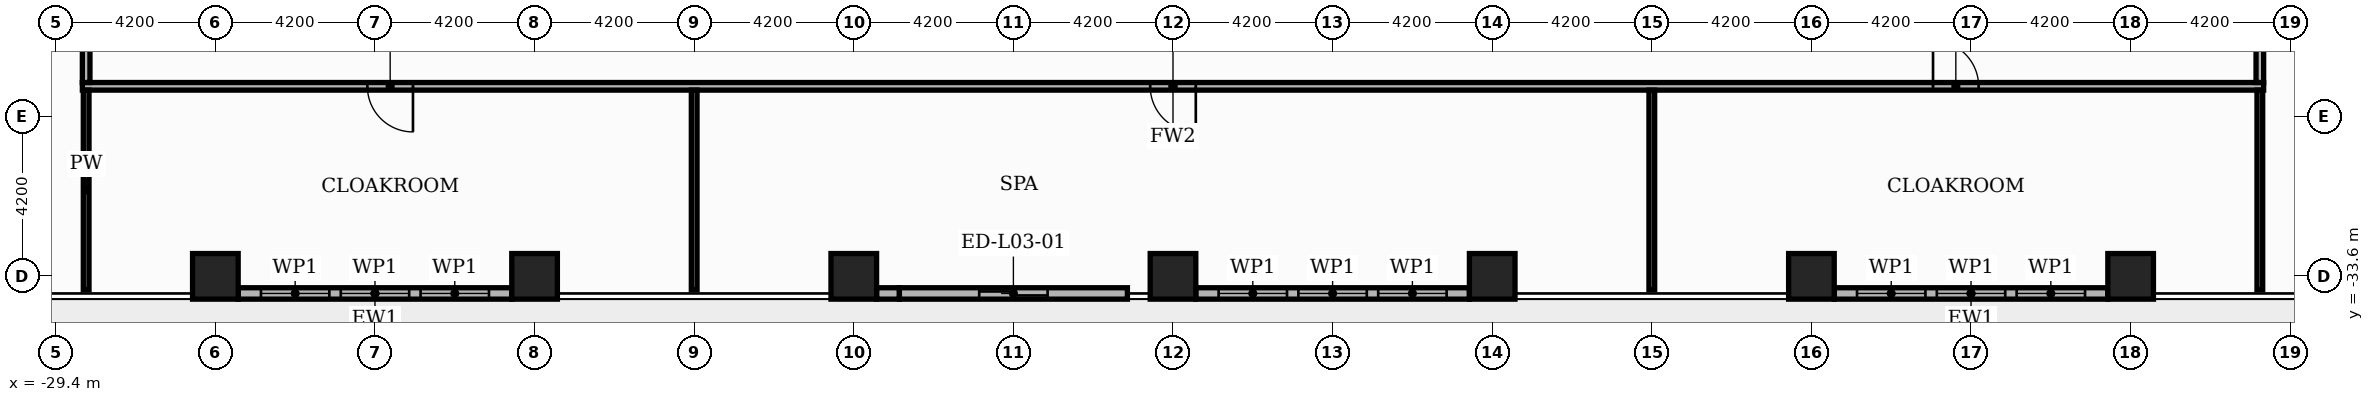
"""IFC4 building model, lengths in metres.
Left out: names, types, materials, properties, quantities, classifications, styles, units other than length and angle.
Written with IfcOpenShell. Run it as: python <this file> out.ifc"""

import sys

from ifc_helpers import new_model, si_unit, direction, frame, frame_2d, origin, origin_2d, place, context, subcontext, project, spatial, rectangle, extrude, element, fill, save


model = new_model("IFC4")
c1 = context("Model", 3, precision=1e-05, world=origin(), true_north=direction((0.0, 1.0)))
c2 = subcontext(c1, "Body", "Model", "MODEL_VIEW")
j1 = project(units=[si_unit("LENGTHUNIT", "METRE"), si_unit("PLANEANGLEUNIT", "RADIAN")], contexts=[c1])
p1 = place(None, origin())
s1 = spatial("IfcSite", under=j1, at=p1, CompositionType="ELEMENT")
p2 = place(p1, origin())
s2 = spatial("IfcBuilding", under=s1, at=p2, CompositionType="ELEMENT")
p3 = place(p2, frame((0.0, 0.0, 16.8)))
s3 = spatial("IfcBuildingStorey", under=s2, at=p3, CompositionType="ELEMENT", Elevation=16.8)
for number, where, z_axis, x_axis in (
    (1, (0.0, -33.6, 0.0), (0.0, 0.0, 1.0), (1.0, 0.0, 0.0)),
    (2, (8.4, -33.6, 0.0), (0.0, 0.0, 1.0), (1.0, 0.0, 0.0)),
    (3, (16.8, -33.6, 0.0), (0.0, 0.0, 1.0), (1.0, 0.0, 0.0)),
    (4, (25.2, -33.6, 0.0), (0.0, 0.0, 1.0), (1.0, 0.0, 0.0)),
    (5, (-8.4, -33.6, 0.0), (0.0, 0.0, 1.0), (1.0, 0.0, 0.0)),
    (6, (-16.8, -33.6, 0.0), (0.0, 0.0, 1.0), (1.0, 0.0, 0.0)),
    (7, (-25.2, -33.6, 0.0), (0.0, 0.0, 1.0), (1.0, 0.0, 0.0)),
):
    element("IfcColumn", number, at=place(p3, frame(where, z_axis=z_axis, x_axis=x_axis)), inside=s3, PredefinedType="COLUMN", context=c2, shape_type="SweptSolid", body=[
        extrude(rectangle(XDim=1.2, YDim=1.2, at=origin_2d()), origin(), (0.0, 0.0, 1.0), 5.4),
    ])
p4 = place(p3, frame((-24.6, -34.05, 0.0), z_axis=(0.0, 0.0, 1.0), x_axis=(1.0, 0.0, 0.0)))
e8 = element("IfcWall", 8, at=p4, inside=s3, PredefinedType="STANDARD", context=c2, shape_type="SweptSolid", body=[
    extrude(rectangle(XDim=7.2, YDim=0.3, at=frame_2d((3.6, 0.0))), origin(), (0.0, 0.0, 1.0), 4.98),
])
p5 = place(p4, frame((0.6, 0.0, 0.6)))
e9 = element("IfcOpeningElement", 9, at=p5, cuts=e8, PredefinedType="OPENING", context=c2, shape_type="SweptSolid", body=[
    extrude(rectangle(XDim=1.8, YDim=3.0, at=frame_2d((0.9, 1.5))), frame((0.0, 0.16, 0.0), z_axis=(0.0, -1.0, 0.0), x_axis=(1.0, 0.0, 0.0)), (0.0, 0.0, 1.0), 0.32),
])
p6 = place(p4, frame((2.7, 0.0, 0.6)))
e10 = element("IfcOpeningElement", 10, at=p6, cuts=e8, PredefinedType="OPENING", context=c2, shape_type="SweptSolid", body=[
    extrude(rectangle(XDim=1.8, YDim=3.0, at=frame_2d((0.9, 1.5))), frame((0.0, 0.16, 0.0), z_axis=(0.0, -1.0, 0.0), x_axis=(1.0, 0.0, 0.0)), (0.0, 0.0, 1.0), 0.32),
])
p7 = place(p4, frame((4.8, 0.0, 0.6)))
e11 = element("IfcOpeningElement", 11, at=p7, cuts=e8, PredefinedType="OPENING", context=c2, shape_type="SweptSolid", body=[
    extrude(rectangle(XDim=1.8, YDim=3.0, at=frame_2d((0.9, 1.5))), frame((0.0, 0.16, 0.0), z_axis=(0.0, -1.0, 0.0), x_axis=(1.0, 0.0, 0.0)), (0.0, 0.0, 1.0), 0.32),
])
p8 = place(p3, frame((-7.8, -34.05, 0.0), z_axis=(0.0, 0.0, 1.0), x_axis=(1.0, 0.0, 0.0)))
e12 = element("IfcWall", 12, at=p8, inside=s3, PredefinedType="STANDARD", context=c2, shape_type="SweptSolid", body=[
    extrude(rectangle(XDim=0.6, YDim=0.3, at=frame_2d((0.3, 0.0))), origin(), (0.0, 0.0, 1.0), 4.98),
])
p9 = place(p3, frame((-7.2, -34.05, 0.0), z_axis=(0.0, 0.0, 1.0), x_axis=(1.0, 0.0, 0.0)))
e13 = element("IfcWall", 13, at=p9, inside=s3, PredefinedType="STANDARD", context=c2, shape_type="SweptSolid", body=[
    extrude(rectangle(XDim=6.0, YDim=0.3, at=frame_2d((3.0, 0.0))), origin(), (0.0, 0.0, 1.0), 4.98),
])
p10 = place(p9, frame((2.1, 0.0, 0.0)))
e14 = element("IfcOpeningElement", 14, at=p10, cuts=e13, PredefinedType="OPENING", context=c2, shape_type="SweptSolid", body=[
    extrude(rectangle(XDim=1.8, YDim=2.4, at=frame_2d((0.9, 1.2))), frame((0.0, 0.16, 0.0), z_axis=(0.0, -1.0, 0.0), x_axis=(1.0, 0.0, 0.0)), (0.0, 0.0, 1.0), 0.32),
])
p11 = place(p3, frame((0.6, -34.05, 0.0), z_axis=(0.0, 0.0, 1.0), x_axis=(1.0, 0.0, 0.0)))
e15 = element("IfcWall", 15, at=p11, inside=s3, PredefinedType="STANDARD", context=c2, shape_type="SweptSolid", body=[
    extrude(rectangle(XDim=7.2, YDim=0.3, at=frame_2d((3.6, 0.0))), origin(), (0.0, 0.0, 1.0), 4.98),
])
p12 = place(p11, frame((0.6, 0.0, 0.6)))
e16 = element("IfcOpeningElement", 16, at=p12, cuts=e15, PredefinedType="OPENING", context=c2, shape_type="SweptSolid", body=[
    extrude(rectangle(XDim=1.8, YDim=3.0, at=frame_2d((0.9, 1.5))), frame((0.0, 0.16, 0.0), z_axis=(0.0, -1.0, 0.0), x_axis=(1.0, 0.0, 0.0)), (0.0, 0.0, 1.0), 0.32),
])
p13 = place(p11, frame((2.7, 0.0, 0.6)))
e17 = element("IfcOpeningElement", 17, at=p13, cuts=e15, PredefinedType="OPENING", context=c2, shape_type="SweptSolid", body=[
    extrude(rectangle(XDim=1.8, YDim=3.0, at=frame_2d((0.9, 1.5))), frame((0.0, 0.16, 0.0), z_axis=(0.0, -1.0, 0.0), x_axis=(1.0, 0.0, 0.0)), (0.0, 0.0, 1.0), 0.32),
])
p14 = place(p11, frame((4.8, 0.0, 0.6)))
e18 = element("IfcOpeningElement", 18, at=p14, cuts=e15, PredefinedType="OPENING", context=c2, shape_type="SweptSolid", body=[
    extrude(rectangle(XDim=1.8, YDim=3.0, at=frame_2d((0.9, 1.5))), frame((0.0, 0.16, 0.0), z_axis=(0.0, -1.0, 0.0), x_axis=(1.0, 0.0, 0.0)), (0.0, 0.0, 1.0), 0.32),
])
p15 = place(p3, frame((17.4, -34.05, 0.0), z_axis=(0.0, 0.0, 1.0), x_axis=(1.0, 0.0, 0.0)))
e19 = element("IfcWall", 19, at=p15, inside=s3, PredefinedType="STANDARD", context=c2, shape_type="SweptSolid", body=[
    extrude(rectangle(XDim=7.2, YDim=0.3, at=frame_2d((3.6, 0.0))), origin(), (0.0, 0.0, 1.0), 4.98),
])
p16 = place(p15, frame((0.6, 0.0, 0.6)))
e20 = element("IfcOpeningElement", 20, at=p16, cuts=e19, PredefinedType="OPENING", context=c2, shape_type="SweptSolid", body=[
    extrude(rectangle(XDim=1.8, YDim=3.0, at=frame_2d((0.9, 1.5))), frame((0.0, 0.16, 0.0), z_axis=(0.0, -1.0, 0.0), x_axis=(1.0, 0.0, 0.0)), (0.0, 0.0, 1.0), 0.32),
])
p17 = place(p15, frame((2.7, 0.0, 0.6)))
e21 = element("IfcOpeningElement", 21, at=p17, cuts=e19, PredefinedType="OPENING", context=c2, shape_type="SweptSolid", body=[
    extrude(rectangle(XDim=1.8, YDim=3.0, at=frame_2d((0.9, 1.5))), frame((0.0, 0.16, 0.0), z_axis=(0.0, -1.0, 0.0), x_axis=(1.0, 0.0, 0.0)), (0.0, 0.0, 1.0), 0.32),
])
p18 = place(p15, frame((4.8, 0.0, 0.6)))
e22 = element("IfcOpeningElement", 22, at=p18, cuts=e19, PredefinedType="OPENING", context=c2, shape_type="SweptSolid", body=[
    extrude(rectangle(XDim=1.8, YDim=3.0, at=frame_2d((0.9, 1.5))), frame((0.0, 0.16, 0.0), z_axis=(0.0, -1.0, 0.0), x_axis=(1.0, 0.0, 0.0)), (0.0, 0.0, 1.0), 0.32),
])
p19 = place(p3, frame((-28.7, -28.6, 0.0), z_axis=(0.0, 0.0, 1.0), x_axis=(1.0, 0.0, 0.0)))
e23 = element("IfcWall", 23, at=p19, inside=s3, PredefinedType="PARTITIONING", context=c2, shape_type="SweptSolid", body=[
    extrude(rectangle(XDim=57.4, YDim=0.2, at=frame_2d((28.7, 0.0))), origin(), (0.0, 0.0, 1.0), 4.68),
])
p20 = place(p19, frame((7.5, 0.0, 0.0)))
e24 = element("IfcOpeningElement", 24, at=p20, cuts=e23, PredefinedType="OPENING", context=c2, shape_type="SweptSolid", body=[
    extrude(rectangle(XDim=1.2, YDim=2.2, at=frame_2d((0.6, 1.1))), frame((0.0, 0.11, 0.0), z_axis=(0.0, -1.0, 0.0), x_axis=(1.0, 0.0, 0.0)), (0.0, 0.0, 1.0), 0.22),
])
p21 = place(p19, frame((28.1, 0.0, 0.0)))
e25 = element("IfcOpeningElement", 25, at=p21, cuts=e23, PredefinedType="OPENING", context=c2, shape_type="SweptSolid", body=[
    extrude(rectangle(XDim=1.2, YDim=2.2, at=frame_2d((0.6, 1.1))), frame((0.0, 0.11, 0.0), z_axis=(0.0, -1.0, 0.0), x_axis=(1.0, 0.0, 0.0)), (0.0, 0.0, 1.0), 0.22),
])
p22 = place(p19, frame((48.7, 0.0, 0.0)))
e26 = element("IfcOpeningElement", 26, at=p22, cuts=e23, PredefinedType="OPENING", context=c2, shape_type="SweptSolid", body=[
    extrude(rectangle(XDim=1.2, YDim=2.2, at=frame_2d((0.6, 1.1))), frame((0.0, 0.11, 0.0), z_axis=(0.0, -1.0, 0.0), x_axis=(1.0, 0.0, 0.0)), (0.0, 0.0, 1.0), 0.22),
])
p23 = place(p3, frame((-28.6, -33.95, 0.0), z_axis=(0.0, 0.0, 1.0), x_axis=(0.0, 1.0, 0.0)))
e27 = element("IfcWall", 27, at=p23, inside=s3, PredefinedType="PARTITIONING", context=c2, shape_type="SweptSolid", body=[
    extrude(rectangle(XDim=5.25, YDim=0.15, at=frame_2d((2.625, 0.0))), origin(), (0.0, 0.0, 1.0), 4.78),
])
p24 = place(p3, frame((-28.6, -28.5, 0.0), z_axis=(0.0, 0.0, 1.0), x_axis=(0.0, 1.0, 0.0)))
e28 = element("IfcWall", 28, at=p24, inside=s3, PredefinedType="PARTITIONING", context=c2, shape_type="SweptSolid", body=[
    extrude(rectangle(XDim=57.0, YDim=0.2, at=frame_2d((28.5, 0.0))), origin(), (0.0, 0.0, 1.0), 4.78),
])
p25 = place(p24, frame((9.4, 0.0, 0.0)))
e29 = element("IfcOpeningElement", 29, at=p25, cuts=e28, PredefinedType="OPENING", context=c2, shape_type="SweptSolid", body=[
    extrude(rectangle(XDim=1.2, YDim=2.2, at=frame_2d((0.6, 1.1))), frame((0.0, 0.11, 0.0), z_axis=(0.0, -1.0, 0.0), x_axis=(1.0, 0.0, 0.0)), (0.0, 0.0, 1.0), 0.22),
])
p26 = place(p24, frame((27.9, 0.0, 0.0)))
e30 = element("IfcOpeningElement", 30, at=p26, cuts=e28, PredefinedType="OPENING", context=c2, shape_type="SweptSolid", body=[
    extrude(rectangle(XDim=1.2, YDim=2.2, at=frame_2d((0.6, 1.1))), frame((0.0, 0.11, 0.0), z_axis=(0.0, -1.0, 0.0), x_axis=(1.0, 0.0, 0.0)), (0.0, 0.0, 1.0), 0.22),
])
p27 = place(p24, frame((46.4, 0.0, 0.0)))
e31 = element("IfcOpeningElement", 31, at=p27, cuts=e28, PredefinedType="OPENING", context=c2, shape_type="SweptSolid", body=[
    extrude(rectangle(XDim=1.2, YDim=2.2, at=frame_2d((0.6, 1.1))), frame((0.0, 0.11, 0.0), z_axis=(0.0, -1.0, 0.0), x_axis=(1.0, 0.0, 0.0)), (0.0, 0.0, 1.0), 0.22),
])
for number, where, z_axis, x_axis in (
    (32, (-12.6, -33.95, 0.0), (0.0, 0.0, 1.0), (0.0, 1.0, 0.0)),
    (33, (12.6, -33.95, 0.0), (0.0, 0.0, 1.0), (0.0, 1.0, 0.0)),
    (34, (28.6, -33.95, 0.0), (0.0, 0.0, 1.0), (0.0, 1.0, 0.0)),
):
    element("IfcWall", number, at=place(p3, frame(where, z_axis=z_axis, x_axis=x_axis)), inside=s3, PredefinedType="PARTITIONING", context=c2, shape_type="SweptSolid", body=[
        extrude(rectangle(XDim=5.25, YDim=0.15, at=frame_2d((2.625, 0.0))), origin(), (0.0, 0.0, 1.0), 4.78),
    ])
p28 = place(p3, frame((28.6, -28.5, 0.0), z_axis=(0.0, 0.0, 1.0), x_axis=(0.0, 1.0, 0.0)))
e35 = element("IfcWall", 35, at=p28, inside=s3, PredefinedType="PARTITIONING", context=c2, shape_type="SweptSolid", body=[
    extrude(rectangle(XDim=57.0, YDim=0.2, at=frame_2d((28.5, 0.0))), origin(), (0.0, 0.0, 1.0), 4.78),
])
p29 = place(p28, frame((5.2, 0.0, 0.0)))
e36 = element("IfcOpeningElement", 36, at=p29, cuts=e35, PredefinedType="OPENING", context=c2, shape_type="SweptSolid", body=[
    extrude(rectangle(XDim=1.2, YDim=2.2, at=frame_2d((0.6, 1.1))), frame((0.0, 0.11, 0.0), z_axis=(0.0, -1.0, 0.0), x_axis=(1.0, 0.0, 0.0)), (0.0, 0.0, 1.0), 0.22),
])
p30 = place(p28, frame((15.3, 0.0, 0.0)))
e37 = element("IfcOpeningElement", 37, at=p30, cuts=e35, PredefinedType="OPENING", context=c2, shape_type="SweptSolid", body=[
    extrude(rectangle(XDim=1.2, YDim=2.2, at=frame_2d((0.6, 1.1))), frame((0.0, 0.11, 0.0), z_axis=(0.0, -1.0, 0.0), x_axis=(1.0, 0.0, 0.0)), (0.0, 0.0, 1.0), 0.22),
])
p31 = place(p28, frame((27.9, 0.0, 0.0)))
e38 = element("IfcOpeningElement", 38, at=p31, cuts=e35, PredefinedType="OPENING", context=c2, shape_type="SweptSolid", body=[
    extrude(rectangle(XDim=1.2, YDim=2.2, at=frame_2d((0.6, 1.1))), frame((0.0, 0.11, 0.0), z_axis=(0.0, -1.0, 0.0), x_axis=(1.0, 0.0, 0.0)), (0.0, 0.0, 1.0), 0.22),
])
p32 = place(p28, frame((40.5, 0.0, 0.0)))
e39 = element("IfcOpeningElement", 39, at=p32, cuts=e35, PredefinedType="OPENING", context=c2, shape_type="SweptSolid", body=[
    extrude(rectangle(XDim=1.2, YDim=2.2, at=frame_2d((0.6, 1.1))), frame((0.0, 0.11, 0.0), z_axis=(0.0, -1.0, 0.0), x_axis=(1.0, 0.0, 0.0)), (0.0, 0.0, 1.0), 0.22),
])
p33 = place(p28, frame((50.6, 0.0, 0.0)))
e40 = element("IfcOpeningElement", 40, at=p33, cuts=e35, PredefinedType="OPENING", context=c2, shape_type="SweptSolid", body=[
    extrude(rectangle(XDim=1.2, YDim=2.2, at=frame_2d((0.6, 1.1))), frame((0.0, 0.11, 0.0), z_axis=(0.0, -1.0, 0.0), x_axis=(1.0, 0.0, 0.0)), (0.0, 0.0, 1.0), 0.22),
])
p34 = place(p5, origin())
e41 = element("IfcWindow", 41, at=p34, inside=s3, PartitioningType="SINGLE_PANEL", PredefinedType="WINDOW", context=c2, shape_type="SweptSolid", body=[
    extrude(rectangle(XDim=1.8, YDim=3.0, at=frame_2d((0.9, 1.5))), frame((0.0, 0.03, 0.0), z_axis=(0.0, -1.0, 0.0), x_axis=(1.0, 0.0, 0.0)), (0.0, 0.0, 1.0), 0.06),
])
fill(e9, e41)
p35 = place(p6, origin())
e42 = element("IfcWindow", 42, at=p35, inside=s3, PartitioningType="SINGLE_PANEL", PredefinedType="WINDOW", context=c2, shape_type="SweptSolid", body=[
    extrude(rectangle(XDim=1.8, YDim=3.0, at=frame_2d((0.9, 1.5))), frame((0.0, 0.03, 0.0), z_axis=(0.0, -1.0, 0.0), x_axis=(1.0, 0.0, 0.0)), (0.0, 0.0, 1.0), 0.06),
])
fill(e10, e42)
p36 = place(p7, origin())
e43 = element("IfcWindow", 43, at=p36, inside=s3, PartitioningType="SINGLE_PANEL", PredefinedType="WINDOW", context=c2, shape_type="SweptSolid", body=[
    extrude(rectangle(XDim=1.8, YDim=3.0, at=frame_2d((0.9, 1.5))), frame((0.0, 0.03, 0.0), z_axis=(0.0, -1.0, 0.0), x_axis=(1.0, 0.0, 0.0)), (0.0, 0.0, 1.0), 0.06),
])
fill(e11, e43)
p37 = place(p10, origin())
e44 = element("IfcDoor", 44, at=p37, inside=s3, OperationType="SLIDING_TO_LEFT", PredefinedType="DOOR", context=c2, shape_type="SweptSolid", body=[
    extrude(rectangle(XDim=1.8, YDim=2.4, at=frame_2d((0.9, 1.2))), frame((0.0, 0.025, 0.0), z_axis=(0.0, -1.0, 0.0), x_axis=(1.0, 0.0, 0.0)), (0.0, 0.0, 1.0), 0.05),
])
fill(e14, e44)
p38 = place(p12, origin())
e45 = element("IfcWindow", 45, at=p38, inside=s3, PartitioningType="SINGLE_PANEL", PredefinedType="WINDOW", context=c2, shape_type="SweptSolid", body=[
    extrude(rectangle(XDim=1.8, YDim=3.0, at=frame_2d((0.9, 1.5))), frame((0.0, 0.03, 0.0), z_axis=(0.0, -1.0, 0.0), x_axis=(1.0, 0.0, 0.0)), (0.0, 0.0, 1.0), 0.06),
])
fill(e16, e45)
p39 = place(p13, origin())
e46 = element("IfcWindow", 46, at=p39, inside=s3, PartitioningType="SINGLE_PANEL", PredefinedType="WINDOW", context=c2, shape_type="SweptSolid", body=[
    extrude(rectangle(XDim=1.8, YDim=3.0, at=frame_2d((0.9, 1.5))), frame((0.0, 0.03, 0.0), z_axis=(0.0, -1.0, 0.0), x_axis=(1.0, 0.0, 0.0)), (0.0, 0.0, 1.0), 0.06),
])
fill(e17, e46)
p40 = place(p14, origin())
e47 = element("IfcWindow", 47, at=p40, inside=s3, PartitioningType="SINGLE_PANEL", PredefinedType="WINDOW", context=c2, shape_type="SweptSolid", body=[
    extrude(rectangle(XDim=1.8, YDim=3.0, at=frame_2d((0.9, 1.5))), frame((0.0, 0.03, 0.0), z_axis=(0.0, -1.0, 0.0), x_axis=(1.0, 0.0, 0.0)), (0.0, 0.0, 1.0), 0.06),
])
fill(e18, e47)
p41 = place(p16, origin())
e48 = element("IfcWindow", 48, at=p41, inside=s3, PartitioningType="SINGLE_PANEL", PredefinedType="WINDOW", context=c2, shape_type="SweptSolid", body=[
    extrude(rectangle(XDim=1.8, YDim=3.0, at=frame_2d((0.9, 1.5))), frame((0.0, 0.03, 0.0), z_axis=(0.0, -1.0, 0.0), x_axis=(1.0, 0.0, 0.0)), (0.0, 0.0, 1.0), 0.06),
])
fill(e20, e48)
p42 = place(p17, origin())
e49 = element("IfcWindow", 49, at=p42, inside=s3, PartitioningType="SINGLE_PANEL", PredefinedType="WINDOW", context=c2, shape_type="SweptSolid", body=[
    extrude(rectangle(XDim=1.8, YDim=3.0, at=frame_2d((0.9, 1.5))), frame((0.0, 0.03, 0.0), z_axis=(0.0, -1.0, 0.0), x_axis=(1.0, 0.0, 0.0)), (0.0, 0.0, 1.0), 0.06),
])
fill(e21, e49)
p43 = place(p18, origin())
e50 = element("IfcWindow", 50, at=p43, inside=s3, PartitioningType="SINGLE_PANEL", PredefinedType="WINDOW", context=c2, shape_type="SweptSolid", body=[
    extrude(rectangle(XDim=1.8, YDim=3.0, at=frame_2d((0.9, 1.5))), frame((0.0, 0.03, 0.0), z_axis=(0.0, -1.0, 0.0), x_axis=(1.0, 0.0, 0.0)), (0.0, 0.0, 1.0), 0.06),
])
fill(e22, e50)
p44 = place(p20, origin())
e51 = element("IfcDoor", 51, at=p44, inside=s3, OperationType="SINGLE_SWING_RIGHT", PredefinedType="DOOR", context=c2, shape_type="SweptSolid", body=[
    extrude(rectangle(XDim=1.2, YDim=2.2, at=frame_2d((0.6, 1.1))), frame((0.0, 0.025, 0.0), z_axis=(0.0, -1.0, 0.0), x_axis=(1.0, 0.0, 0.0)), (0.0, 0.0, 1.0), 0.05),
])
fill(e24, e51)
p45 = place(p21, origin())
e52 = element("IfcDoor", 52, at=p45, inside=s3, OperationType="SINGLE_SWING_RIGHT", PredefinedType="DOOR", context=c2, shape_type="SweptSolid", body=[
    extrude(rectangle(XDim=1.2, YDim=2.2, at=frame_2d((0.6, 1.1))), frame((0.0, 0.025, 0.0), z_axis=(0.0, -1.0, 0.0), x_axis=(1.0, 0.0, 0.0)), (0.0, 0.0, 1.0), 0.05),
])
fill(e25, e52)
p46 = place(p22, origin())
e53 = element("IfcDoor", 53, at=p46, inside=s3, OperationType="SINGLE_SWING_LEFT", PredefinedType="DOOR", context=c2, shape_type="SweptSolid", body=[
    extrude(rectangle(XDim=1.2, YDim=2.2, at=frame_2d((0.6, 1.1))), frame((0.0, 0.025, 0.0), z_axis=(0.0, -1.0, 0.0), x_axis=(1.0, 0.0, 0.0)), (0.0, 0.0, 1.0), 0.05),
])
fill(e26, e53)
save(model, sys.argv[1])
